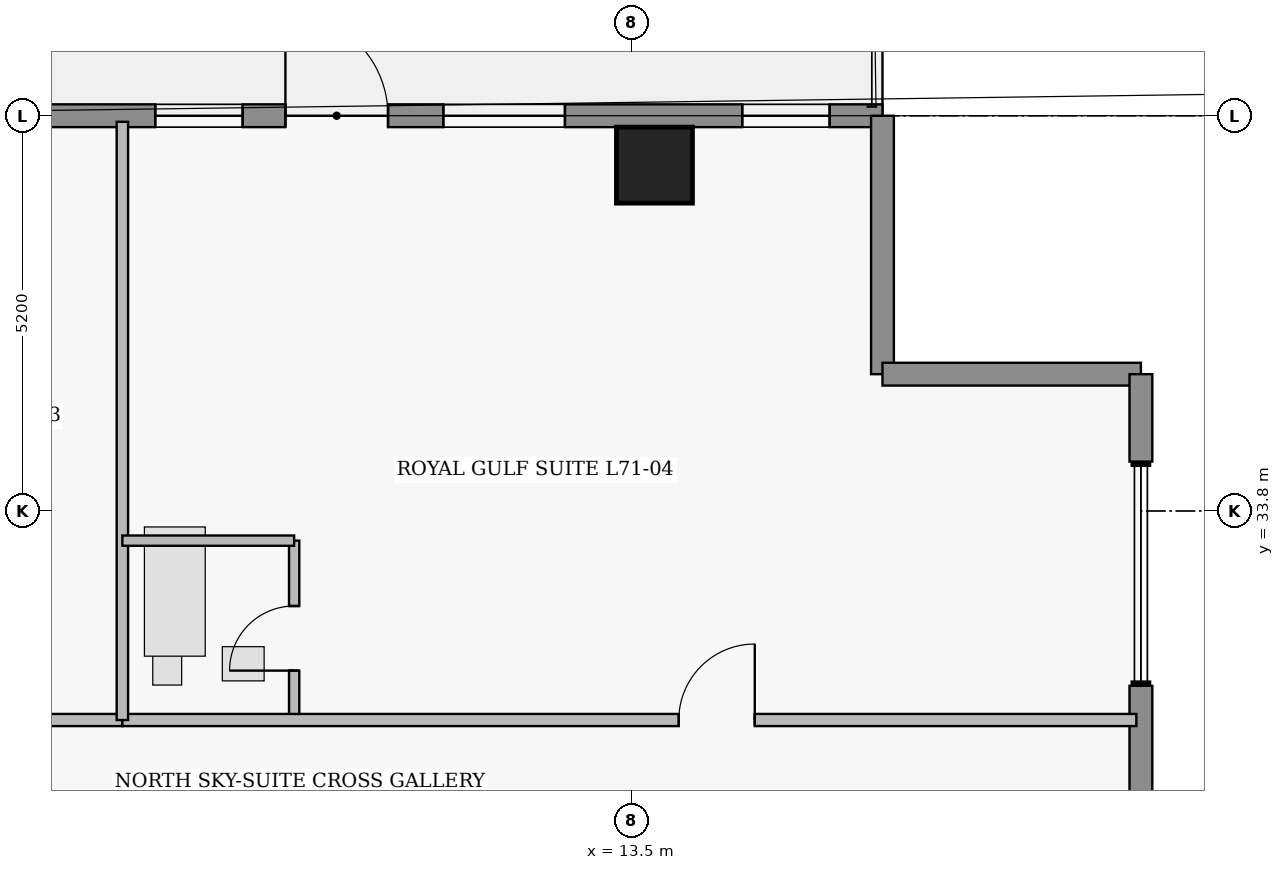
"""IFC4 building model, lengths in metres.
Left out: names, types, materials, properties, quantities, classifications, styles, units other than length and angle.
Written with IfcOpenShell. Run it as: python <this file> out.ifc"""

import sys

from ifc_helpers import new_model, si_unit, direction, frame, frame_2d, origin, origin_2d, place, context, subcontext, project, spatial, rectangle, extrude, element, fill, save


model = new_model("IFC4")
c1 = context("Model", 3, precision=1e-05, world=origin(), true_north=direction((0.0, 1.0)))
c2 = subcontext(c1, "Body", "Model", "MODEL_VIEW")
j1 = project(units=[si_unit("LENGTHUNIT", "METRE"), si_unit("PLANEANGLEUNIT", "RADIAN")], contexts=[c1])
p1 = place(None, origin())
s1 = spatial("IfcSite", under=j1, at=p1, CompositionType="ELEMENT")
p2 = place(p1, origin())
s2 = spatial("IfcBuilding", under=s1, at=p2, CompositionType="ELEMENT")
p3 = place(p2, frame((0.0, 0.0, 280.35)))
s3 = spatial("IfcBuildingStorey", under=s2, at=p3, CompositionType="ELEMENT", Elevation=280.35)
p4 = place(p3, frame((13.8, 38.35, 0.0), z_axis=(0.0, 0.0, 1.0), x_axis=(1.0, 0.0, 0.0)))
e1 = element("IfcColumn", 1, at=p4, inside=s3, PredefinedType="COLUMN", context=c2, shape_type="SweptSolid", body=[
    extrude(rectangle(XDim=1.0, YDim=1.0, at=origin_2d()), origin(), (0.0, 0.0, 1.0), 3.7),
])
p5 = place(p3, frame((-5.52, 39.0, 0.0), z_axis=(0.0, 0.0, 1.0), x_axis=(1.0, 0.0, 0.0)))
e2 = element("IfcWall", 2, at=p5, inside=s3, PredefinedType="STANDARD", context=c2, shape_type="SweptSolid", body=[
    extrude(rectangle(XDim=22.32, YDim=0.3, at=frame_2d((11.16, 0.0))), origin(), (0.0, 0.0, 1.0), 3.48),
])
p6 = place(p5, frame((14.465, 0.0, 0.0)))
e3 = element("IfcOpeningElement", 3, at=p6, cuts=e2, PredefinedType="OPENING", context=c2, shape_type="SweptSolid", body=[
    extrude(rectangle(XDim=1.35, YDim=2.3, at=frame_2d((0.675, 1.15))), frame((0.0, 0.16, 0.0), z_axis=(0.0, -1.0, 0.0), x_axis=(1.0, 0.0, 0.0)), (0.0, 0.0, 1.0), 0.32),
])
p7 = place(p5, frame((5.5, 0.0, 0.85)))
e4 = element("IfcOpeningElement", 4, at=p7, cuts=e2, PredefinedType="OPENING", context=c2, shape_type="SweptSolid", body=[
    extrude(rectangle(XDim=1.6, YDim=1.8, at=frame_2d((0.8, 0.9))), frame((0.0, 0.16, 0.0), z_axis=(0.0, -1.0, 0.0), x_axis=(1.0, 0.0, 0.0)), (0.0, 0.0, 1.0), 0.32),
])
p8 = place(p5, frame((2.035, 0.0, 0.95)))
e5 = element("IfcOpeningElement", 5, at=p8, cuts=e2, PredefinedType="OPENING", context=c2, shape_type="SweptSolid", body=[
    extrude(rectangle(XDim=1.15, YDim=1.55, at=frame_2d((0.575, 0.775))), frame((0.0, 0.16, 0.0), z_axis=(0.0, -1.0, 0.0), x_axis=(1.0, 0.0, 0.0)), (0.0, 0.0, 1.0), 0.32),
])
p9 = place(p5, frame((7.81, 0.0, 0.95)))
e6 = element("IfcOpeningElement", 6, at=p9, cuts=e2, PredefinedType="OPENING", context=c2, shape_type="SweptSolid", body=[
    extrude(rectangle(XDim=1.15, YDim=1.55, at=frame_2d((0.575, 0.775))), frame((0.0, 0.16, 0.0), z_axis=(0.0, -1.0, 0.0), x_axis=(1.0, 0.0, 0.0)), (0.0, 0.0, 1.0), 0.32),
])
p10 = place(p5, frame((12.752, 0.0, 0.95)))
e7 = element("IfcOpeningElement", 7, at=p10, cuts=e2, PredefinedType="OPENING", context=c2, shape_type="SweptSolid", body=[
    extrude(rectangle(XDim=1.15, YDim=1.55, at=frame_2d((0.575, 0.775))), frame((0.0, 0.16, 0.0), z_axis=(0.0, -1.0, 0.0), x_axis=(1.0, 0.0, 0.0)), (0.0, 0.0, 1.0), 0.32),
])
p11 = place(p5, frame((16.542, 0.0, 0.85)))
e8 = element("IfcOpeningElement", 8, at=p11, cuts=e2, PredefinedType="OPENING", context=c2, shape_type="SweptSolid", body=[
    extrude(rectangle(XDim=1.6, YDim=1.8, at=frame_2d((0.8, 0.9))), frame((0.0, 0.16, 0.0), z_axis=(0.0, -1.0, 0.0), x_axis=(1.0, 0.0, 0.0)), (0.0, 0.0, 1.0), 0.32),
])
p12 = place(p5, frame((20.475, 0.0, 0.95)))
e9 = element("IfcOpeningElement", 9, at=p12, cuts=e2, PredefinedType="OPENING", context=c2, shape_type="SweptSolid", body=[
    extrude(rectangle(XDim=1.15, YDim=1.55, at=frame_2d((0.575, 0.775))), frame((0.0, 0.16, 0.0), z_axis=(0.0, -1.0, 0.0), x_axis=(1.0, 0.0, 0.0)), (0.0, 0.0, 1.0), 0.32),
])
for number, where, z_axis, x_axis in (
    (10, (16.8, 39.0, 0.0), (0.0, 0.0, 1.0), (0.0, -1.0, 0.0)),
    (11, (16.8, 35.6, 0.0), (0.0, 0.0, 1.0), (1.0, 0.0, 0.0)),
):
    element("IfcWall", number, at=place(p3, frame(where, z_axis=z_axis, x_axis=x_axis)), inside=s3, PredefinedType="STANDARD", context=c2, shape_type="SweptSolid", body=[
        extrude(rectangle(XDim=3.4, YDim=0.3, at=frame_2d((1.7, 0.0))), origin(), (0.0, 0.0, 1.0), 3.48),
    ])
p13 = place(p3, frame((20.2, 35.6, 0.0), z_axis=(0.0, 0.0, 1.0), x_axis=(0.0, -1.0, 0.0)))
e12 = element("IfcWall", 12, at=p13, inside=s3, PredefinedType="STANDARD", context=c2, shape_type="SweptSolid", body=[
    extrude(rectangle(XDim=1.15, YDim=0.3, at=frame_2d((0.575, 0.0))), origin(), (0.0, 0.0, 1.0), 3.48),
])
p14 = place(p3, frame((20.2, 31.5, 0.0), z_axis=(0.0, 0.0, 1.0), x_axis=(0.0, -1.0, 0.0)))
e13 = element("IfcWall", 13, at=p14, inside=s3, PredefinedType="STANDARD", context=c2, shape_type="SweptSolid", body=[
    extrude(rectangle(XDim=2.57, YDim=0.3, at=frame_2d((1.285, 0.0))), origin(), (0.0, 0.0, 1.0), 3.48),
])
p15 = place(p3, frame((-1.8, 31.05, 0.0), z_axis=(0.0, 0.0, 1.0), x_axis=(1.0, 0.0, 0.0)))
e14 = element("IfcWall", 14, at=p15, inside=s3, PredefinedType="PARTITIONING", context=c2, shape_type="SweptSolid", body=[
    extrude(rectangle(XDim=8.6, YDim=0.16, at=frame_2d((4.3, 0.0))), origin(), (0.0, 0.0, 1.0), 3.48),
])
p16 = place(p15, frame((4.95, 0.0, 0.0)))
e15 = element("IfcOpeningElement", 15, at=p16, cuts=e14, PredefinedType="OPENING", context=c2, shape_type="SweptSolid", body=[
    extrude(rectangle(XDim=1.0, YDim=2.15, at=frame_2d((0.5, 1.075))), frame((0.0, 0.09, 0.0), z_axis=(0.0, -1.0, 0.0), x_axis=(1.0, 0.0, 0.0)), (0.0, 0.0, 1.0), 0.18),
])
p17 = place(p3, frame((9.06, 31.05, 0.0), z_axis=(0.0, 0.0, 1.0), x_axis=(0.0, 1.0, 0.0)))
e16 = element("IfcWall", 16, at=p17, inside=s3, PredefinedType="PLUMBINGWALL", context=c2, shape_type="SweptSolid", body=[
    extrude(rectangle(XDim=2.36, YDim=0.135, at=frame_2d((1.18, 0.0))), origin(), (0.0, 0.0, 1.0), 3.48),
])
p18 = place(p17, frame((0.65, 0.0, 0.0)))
e17 = element("IfcOpeningElement", 17, at=p18, cuts=e16, PredefinedType="OPENING", context=c2, shape_type="SweptSolid", body=[
    extrude(rectangle(XDim=0.85, YDim=2.1, at=frame_2d((0.425, 1.05))), frame((0.0, 0.077, 0.0), z_axis=(0.0, -1.0, 0.0), x_axis=(1.0, 0.0, 0.0)), (0.0, 0.0, 1.0), 0.155),
])
p19 = place(p3, frame((6.8, 31.05, 0.0), z_axis=(0.0, 0.0, 1.0), x_axis=(1.0, 0.0, 0.0)))
e18 = element("IfcWall", 18, at=p19, inside=s3, PredefinedType="PARTITIONING", context=c2, shape_type="SweptSolid", body=[
    extrude(rectangle(XDim=13.34, YDim=0.16, at=frame_2d((6.67, 0.0))), origin(), (0.0, 0.0, 1.0), 3.48),
])
p20 = place(p19, frame((7.32, 0.0, 0.0)))
e19 = element("IfcOpeningElement", 19, at=p20, cuts=e18, PredefinedType="OPENING", context=c2, shape_type="SweptSolid", body=[
    extrude(rectangle(XDim=1.0, YDim=2.15, at=frame_2d((0.5, 1.075))), frame((0.0, 0.09, 0.0), z_axis=(0.0, -1.0, 0.0), x_axis=(1.0, 0.0, 0.0)), (0.0, 0.0, 1.0), 0.18),
])
p21 = place(p3, frame((6.8, 31.05, 0.0), z_axis=(0.0, 0.0, 1.0), x_axis=(0.0, 1.0, 0.0)))
e20 = element("IfcWall", 20, at=p21, inside=s3, PredefinedType="PARTITIONING", context=c2, shape_type="SweptSolid", body=[
    extrude(rectangle(XDim=7.87, YDim=0.15, at=frame_2d((3.935, 0.0))), origin(), (0.0, 0.0, 1.0), 3.48),
])
p22 = place(p3, frame((6.8, 33.41, 0.0), z_axis=(0.0, 0.0, 1.0), x_axis=(1.0, 0.0, 0.0)))
e21 = element("IfcWall", 21, at=p22, inside=s3, PredefinedType="PLUMBINGWALL", context=c2, shape_type="SweptSolid", body=[
    extrude(rectangle(XDim=2.26, YDim=0.135, at=frame_2d((1.13, 0.0))), origin(), (0.0, 0.0, 1.0), 3.076),
])
p23 = place(p6, origin())
e22 = element("IfcDoor", 22, at=p23, inside=s3, OperationType="SINGLE_SWING_LEFT", PredefinedType="DOOR", context=c2, shape_type="SweptSolid", body=[
    extrude(rectangle(XDim=1.35, YDim=2.3, at=frame_2d((0.675, 1.15))), frame((0.0, 0.025, 0.0), z_axis=(0.0, -1.0, 0.0), x_axis=(1.0, 0.0, 0.0)), (0.0, 0.0, 1.0), 0.05),
])
fill(e3, e22)
p24 = place(p10, origin())
e23 = element("IfcWindow", 23, at=p24, inside=s3, PartitioningType="SINGLE_PANEL", PredefinedType="WINDOW", context=c2, shape_type="SweptSolid", body=[
    extrude(rectangle(XDim=1.15, YDim=1.55, at=frame_2d((0.575, 0.775))), frame((0.0, 0.03, 0.0), z_axis=(0.0, -1.0, 0.0), x_axis=(1.0, 0.0, 0.0)), (0.0, 0.0, 1.0), 0.06),
])
fill(e7, e23)
p25 = place(p11, origin())
e24 = element("IfcWindow", 24, at=p25, inside=s3, PartitioningType="SINGLE_PANEL", PredefinedType="WINDOW", context=c2, shape_type="SweptSolid", body=[
    extrude(rectangle(XDim=1.6, YDim=1.8, at=frame_2d((0.8, 0.9))), frame((0.0, 0.03, 0.0), z_axis=(0.0, -1.0, 0.0), x_axis=(1.0, 0.0, 0.0)), (0.0, 0.0, 1.0), 0.06),
])
fill(e8, e24)
p26 = place(p12, origin())
e25 = element("IfcWindow", 25, at=p26, inside=s3, PartitioningType="SINGLE_PANEL", PredefinedType="WINDOW", context=c2, shape_type="SweptSolid", body=[
    extrude(rectangle(XDim=1.15, YDim=1.55, at=frame_2d((0.575, 0.775))), frame((0.0, 0.03, 0.0), z_axis=(0.0, -1.0, 0.0), x_axis=(1.0, 0.0, 0.0)), (0.0, 0.0, 1.0), 0.06),
])
fill(e9, e25)
p27 = place(p18, origin())
e26 = element("IfcDoor", 26, at=p27, inside=s3, OperationType="SINGLE_SWING_LEFT", PredefinedType="DOOR", context=c2, shape_type="SweptSolid", body=[
    extrude(rectangle(XDim=0.85, YDim=2.1, at=frame_2d((0.425, 1.05))), frame((0.0, 0.025, 0.0), z_axis=(0.0, -1.0, 0.0), x_axis=(1.0, 0.0, 0.0)), (0.0, 0.0, 1.0), 0.05),
])
fill(e17, e26)
p28 = place(p20, origin())
e27 = element("IfcDoor", 27, at=p28, inside=s3, OperationType="SINGLE_SWING_RIGHT", PredefinedType="DOOR", context=c2, shape_type="SweptSolid", body=[
    extrude(rectangle(XDim=1.0, YDim=2.15, at=frame_2d((0.5, 1.075))), frame((0.0, 0.025, 0.0), z_axis=(0.0, -1.0, 0.0), x_axis=(1.0, 0.0, 0.0)), (0.0, 0.0, 1.0), 0.05),
])
fill(e19, e27)
save(model, sys.argv[1])
